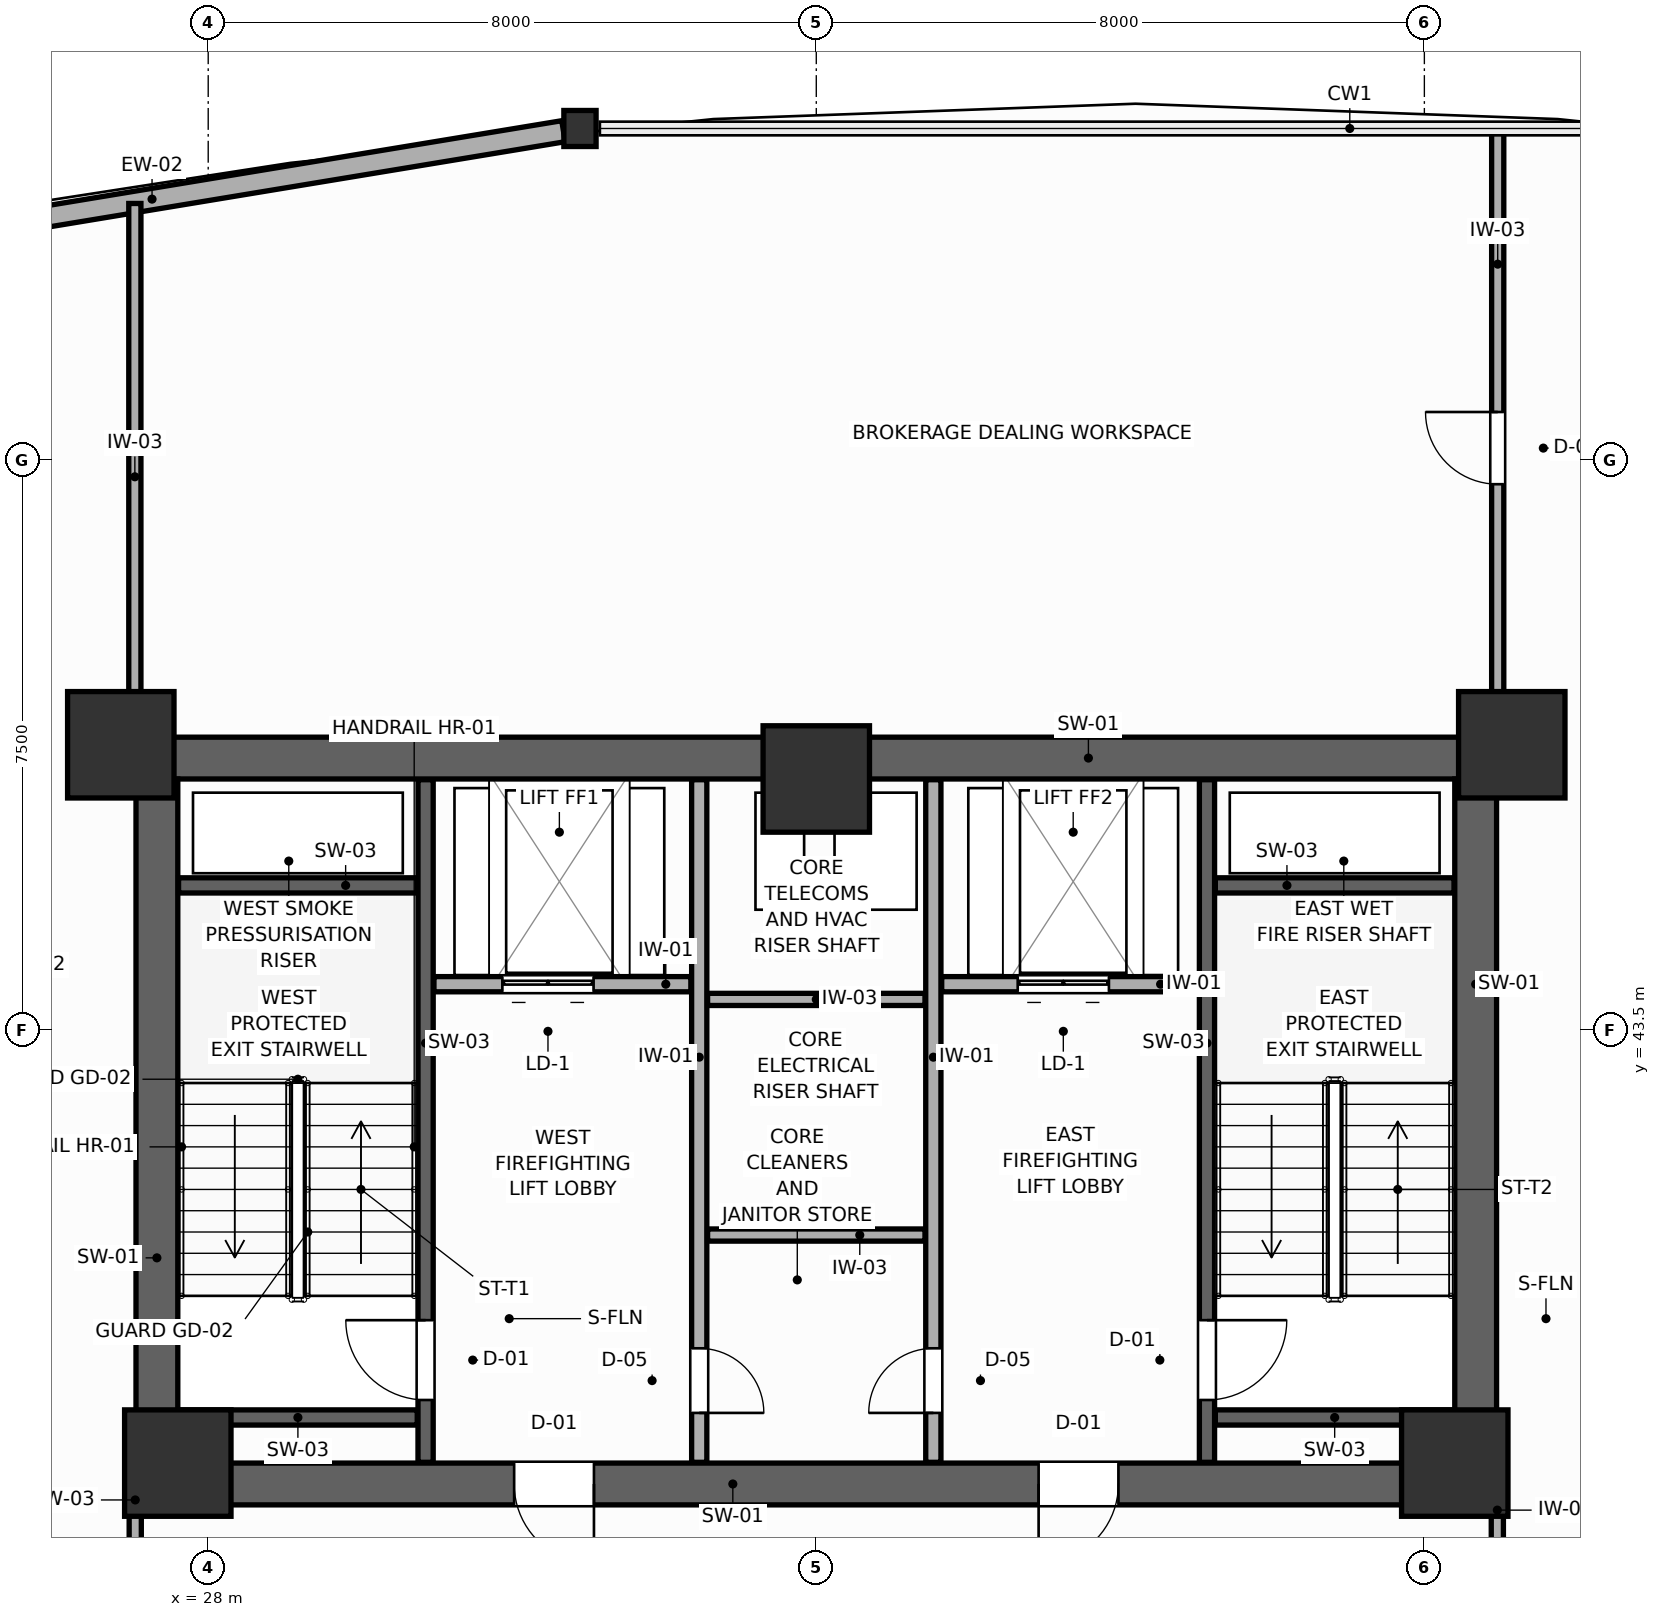
"""IFC4 building model, lengths in metres.
Left out: names, types, materials, properties, quantities, classifications, styles, units other than length and angle.
Written with IfcOpenShell. Run it as: python <this file> out.ifc"""

import sys

from ifc_helpers import new_model, si_unit, direction, frame, frame_2d, origin, origin_2d, place, context, subcontext, project, spatial, rectangle, i_section, extrude, source, transform, mapped, element, fill, save


model = new_model("IFC4")
c1 = context("Model", 3, precision=1e-05, world=origin(), true_north=direction((0.0, 1.0)))
c2 = subcontext(c1, "Body", "Model", "MODEL_VIEW")
j1 = project(units=[si_unit("LENGTHUNIT", "METRE"), si_unit("PLANEANGLEUNIT", "RADIAN")], contexts=[c1])
p1 = place(None, origin())
s1 = spatial("IfcSite", under=j1, at=p1, CompositionType="ELEMENT")
p2 = place(p1, origin())
s2 = spatial("IfcBuilding", under=s1, at=p2, CompositionType="ELEMENT")
p3 = place(p2, frame((0.0, 0.0, 91.2)))
s3 = spatial("IfcBuildingStorey", under=s2, at=p3, CompositionType="ELEMENT", Elevation=91.2)
p4 = place(p3, frame((27.05, 47.075, 0.0), z_axis=(0.0, 0.0, 1.0), x_axis=(1.0, 0.0, 0.0)))
e1 = element("IfcWall", 1, at=p4, inside=s3, PredefinedType="SHEAR", context=c2, shape_type="SweptSolid", body=[
    extrude(rectangle(XDim=17.9, YDim=0.55, at=frame_2d((8.95, 0.0))), origin(), (0.0, 0.0, 1.0), 3.9),
])
p5 = place(p3, frame((27.05, 37.525, 0.0), z_axis=(0.0, 0.0, 1.0), x_axis=(1.0, 0.0, 0.0)))
e2 = element("IfcWall", 2, at=p5, inside=s3, PredefinedType="SHEAR", context=c2, shape_type="SweptSolid", body=[
    extrude(rectangle(XDim=17.9, YDim=0.55, at=frame_2d((8.95, 0.0))), origin(), (0.0, 0.0, 1.0), 3.9),
])
p6 = place(p5, frame((4.975, 0.0, 0.0)))
e3 = element("IfcOpeningElement", 3, at=p6, cuts=e2, PredefinedType="OPENING", context=c2, shape_type="SweptSolid", body=[
    extrude(rectangle(XDim=1.05, YDim=2.1, at=frame_2d((0.525, 1.05))), frame((0.0, 0.285, 0.0), z_axis=(0.0, -1.0, 0.0), x_axis=(1.0, 0.0, 0.0)), (0.0, 0.0, 1.0), 0.57),
])
p7 = place(p5, frame((11.875, 0.0, 0.0)))
e4 = element("IfcOpeningElement", 4, at=p7, cuts=e2, PredefinedType="OPENING", context=c2, shape_type="SweptSolid", body=[
    extrude(rectangle(XDim=1.05, YDim=2.1, at=frame_2d((0.525, 1.05))), frame((0.0, 0.285, 0.0), z_axis=(0.0, -1.0, 0.0), x_axis=(1.0, 0.0, 0.0)), (0.0, 0.0, 1.0), 0.57),
])
for number, where, z_axis, x_axis in (
    (5, (27.325, 37.8, 0.0), (0.0, 0.0, 1.0), (0.0, 1.0, 0.0)),
    (6, (44.675, 37.8, 0.0), (0.0, 0.0, 1.0), (0.0, 1.0, 0.0)),
):
    element("IfcWall", number, at=place(p3, frame(where, z_axis=z_axis, x_axis=x_axis)), inside=s3, PredefinedType="SHEAR", context=c2, shape_type="SweptSolid", body=[
        extrude(rectangle(XDim=9.0, YDim=0.55, at=frame_2d((4.5, 0.0))), origin(), (0.0, 0.0, 1.0), 3.9),
    ])
m1 = source(origin(), c2, "Body", "SweptSolid", [
    extrude(rectangle(XDim=1.4, YDim=1.4, at=origin_2d()), origin(), (0.0, 0.0, 1.0), 3.9),
])
for number, where, z_axis, x_axis in (
    (7, (26.85, 47.25, 0.0), (0.0, 0.0, 1.0), (1.0, 0.0, 0.0)),
    (8, (45.15, 47.25, 0.0), (0.0, 0.0, 1.0), (1.0, 0.0, 0.0)),
    (9, (27.6, 37.8, 0.0), (0.0, 0.0, 1.0), (1.0, 0.0, 0.0)),
    (10, (44.4, 37.8, 0.0), (0.0, 0.0, 1.0), (1.0, 0.0, 0.0)),
    (11, (36.0, 46.8, 0.0), (0.0, 0.0, 1.0), (1.0, 0.0, 0.0)),
):
    element("IfcColumn", number, at=place(p3, frame(where, z_axis=z_axis, x_axis=x_axis)), inside=s3, PredefinedType="COLUMN", context=c2, shape_type="MappedRepresentation", body=[
        mapped(m1, transform((0.0, 0.0, 0.0), scale=1.0)),
    ])
m2 = source(origin(), c2, "Body", "SweptSolid", [
    extrude(i_section(OverallWidth=0.424, OverallDepth=0.474, WebThickness=0.045, FlangeThickness=0.072, FilletRadius=0.015, at=origin_2d()), origin(), (0.0, 0.0, 1.0), 3.9),
])
p8 = place(p3, frame((32.891, 55.358, 0.0), z_axis=(0.0, 0.0, 1.0), x_axis=(1.0, 0.0, 0.0)))
e12 = element("IfcColumn", 12, at=p8, inside=s3, PredefinedType="COLUMN", context=c2, shape_type="MappedRepresentation", body=[
    mapped(m2, transform((0.0, 0.0, 0.0), scale=1.0)),
])
p9 = place(p3, frame((32.674, 55.322, 0.0), z_axis=(0.0, 0.0, 1.0), x_axis=(-0.986649424809, -0.162858566012, 0.0)))
e13 = element("IfcWall", 13, at=p9, inside=s3, PredefinedType="SOLIDWALL", context=c2, shape_type="SweptSolid", body=[
    extrude(rectangle(XDim=16.836, YDim=0.28, at=frame_2d((8.418, 0.0))), origin(), (0.0, 0.0, 1.0), 3.23),
])
p10 = place(p9, frame((11.152, 0.0, 0.75)))
e14 = element("IfcOpeningElement", 14, at=p10, cuts=e13, PredefinedType="OPENING", context=c2, shape_type="SweptSolid", body=[
    extrude(rectangle(XDim=1.7, YDim=1.75, at=frame_2d((0.85, 0.875))), frame((0.0, 0.15, 0.0), z_axis=(0.0, -1.0, 0.0), x_axis=(1.0, 0.0, 0.0)), (0.0, 0.0, 1.0), 0.3),
])
p11 = place(p3, frame((30.86, 37.81, 0.0), z_axis=(0.0, 0.0, 1.0), x_axis=(0.0, 1.0, 0.0)))
e15 = element("IfcWall", 15, at=p11, inside=s3, PredefinedType="SHEAR", context=c2, shape_type="SweptSolid", body=[
    extrude(rectangle(XDim=8.98, YDim=0.2, at=frame_2d((4.49, 0.0))), origin(), (0.0, 0.0, 1.0), 3.9),
])
p12 = place(p11, frame((0.82, 0.0, 0.0)))
e16 = element("IfcOpeningElement", 16, at=p12, cuts=e15, PredefinedType="OPENING", context=c2, shape_type="SweptSolid", body=[
    extrude(rectangle(XDim=1.05, YDim=2.1, at=frame_2d((0.525, 1.05))), frame((0.0, 0.11, 0.0), z_axis=(0.0, -1.0, 0.0), x_axis=(1.0, 0.0, 0.0)), (0.0, 0.0, 1.0), 0.22),
])
for number, where, z_axis, x_axis in (
    (17, (27.61, 45.4, 0.0), (0.0, 0.0, 1.0), (1.0, 0.0, 0.0)),
    (18, (27.61, 38.4, 0.0), (0.0, 0.0, 1.0), (1.0, 0.0, 0.0)),
):
    element("IfcWall", number, at=place(p3, frame(where, z_axis=z_axis, x_axis=x_axis)), inside=s3, PredefinedType="SHEAR", context=c2, shape_type="SweptSolid", body=[
        extrude(rectangle(XDim=3.14, YDim=0.2, at=frame_2d((1.57, 0.0))), origin(), (0.0, 0.0, 1.0), 3.9),
    ])
p13 = place(p3, frame((41.14, 37.81, 0.0), z_axis=(0.0, 0.0, 1.0), x_axis=(0.0, 1.0, 0.0)))
e19 = element("IfcWall", 19, at=p13, inside=s3, PredefinedType="SHEAR", context=c2, shape_type="SweptSolid", body=[
    extrude(rectangle(XDim=8.98, YDim=0.2, at=frame_2d((4.49, 0.0))), origin(), (0.0, 0.0, 1.0), 3.9),
])
p14 = place(p13, frame((0.82, 0.0, 0.0)))
e20 = element("IfcOpeningElement", 20, at=p14, cuts=e19, PredefinedType="OPENING", context=c2, shape_type="SweptSolid", body=[
    extrude(rectangle(XDim=1.05, YDim=2.1, at=frame_2d((0.525, 1.05))), frame((0.0, 0.11, 0.0), z_axis=(0.0, -1.0, 0.0), x_axis=(1.0, 0.0, 0.0)), (0.0, 0.0, 1.0), 0.22),
])
for number, where, z_axis, x_axis in (
    (21, (41.25, 45.4, 0.0), (0.0, 0.0, 1.0), (1.0, 0.0, 0.0)),
    (22, (41.25, 38.4, 0.0), (0.0, 0.0, 1.0), (1.0, 0.0, 0.0)),
):
    element("IfcWall", number, at=place(p3, frame(where, z_axis=z_axis, x_axis=x_axis)), inside=s3, PredefinedType="SHEAR", context=c2, shape_type="SweptSolid", body=[
        extrude(rectangle(XDim=3.14, YDim=0.2, at=frame_2d((1.57, 0.0))), origin(), (0.0, 0.0, 1.0), 3.9),
    ])
p15 = place(p3, frame((30.97, 44.1, 0.0), z_axis=(0.0, 0.0, 1.0), x_axis=(1.0, 0.0, 0.0)))
e23 = element("IfcWall", 23, at=p15, inside=s3, PredefinedType="PARTITIONING", context=c2, shape_type="SweptSolid", body=[
    extrude(rectangle(XDim=3.38, YDim=0.2, at=frame_2d((1.69, 0.0))), origin(), (0.0, 0.0, 1.0), 3.68),
])
p16 = place(p15, frame((0.9, 0.0, 0.0)))
e24 = element("IfcOpeningElement", 24, at=p16, cuts=e23, PredefinedType="OPENING", context=c2, shape_type="SweptSolid", body=[
    extrude(rectangle(XDim=1.2, YDim=2.1, at=frame_2d((0.6, 1.05))), frame((0.0, 0.11, 0.0), z_axis=(0.0, -1.0, 0.0), x_axis=(1.0, 0.0, 0.0)), (0.0, 0.0, 1.0), 0.22),
])
p17 = place(p3, frame((37.65, 44.1, 0.0), z_axis=(0.0, 0.0, 1.0), x_axis=(1.0, 0.0, 0.0)))
e25 = element("IfcWall", 25, at=p17, inside=s3, PredefinedType="PARTITIONING", context=c2, shape_type="SweptSolid", body=[
    extrude(rectangle(XDim=3.38, YDim=0.2, at=frame_2d((1.69, 0.0))), origin(), (0.0, 0.0, 1.0), 3.68),
])
p18 = place(p17, frame((1.0, 0.0, 0.0)))
e26 = element("IfcOpeningElement", 26, at=p18, cuts=e25, PredefinedType="OPENING", context=c2, shape_type="SweptSolid", body=[
    extrude(rectangle(XDim=1.2, YDim=2.1, at=frame_2d((0.6, 1.05))), frame((0.0, 0.11, 0.0), z_axis=(0.0, -1.0, 0.0), x_axis=(1.0, 0.0, 0.0)), (0.0, 0.0, 1.0), 0.22),
])
p19 = place(p3, frame((34.46, 37.81, 0.0), z_axis=(0.0, 0.0, 1.0), x_axis=(0.0, 1.0, 0.0)))
e27 = element("IfcWall", 27, at=p19, inside=s3, PredefinedType="PARTITIONING", context=c2, shape_type="SweptSolid", body=[
    extrude(rectangle(XDim=8.98, YDim=0.2, at=frame_2d((4.49, 0.0))), origin(), (0.0, 0.0, 1.0), 3.68),
])
p20 = place(p19, frame((0.65, 0.0, 0.0)))
e28 = element("IfcOpeningElement", 28, at=p20, cuts=e27, PredefinedType="OPENING", context=c2, shape_type="SweptSolid", body=[
    extrude(rectangle(XDim=0.85, YDim=2.05, at=frame_2d((0.425, 1.025))), frame((0.0, 0.11, 0.0), z_axis=(0.0, -1.0, 0.0), x_axis=(1.0, 0.0, 0.0)), (0.0, 0.0, 1.0), 0.22),
])
p21 = place(p3, frame((37.54, 37.81, 0.0), z_axis=(0.0, 0.0, 1.0), x_axis=(0.0, 1.0, 0.0)))
e29 = element("IfcWall", 29, at=p21, inside=s3, PredefinedType="PARTITIONING", context=c2, shape_type="SweptSolid", body=[
    extrude(rectangle(XDim=8.98, YDim=0.2, at=frame_2d((4.49, 0.0))), origin(), (0.0, 0.0, 1.0), 3.68),
])
p22 = place(p21, frame((0.65, 0.0, 0.0)))
e30 = element("IfcOpeningElement", 30, at=p22, cuts=e29, PredefinedType="OPENING", context=c2, shape_type="SweptSolid", body=[
    extrude(rectangle(XDim=0.85, YDim=2.05, at=frame_2d((0.425, 1.025))), frame((0.0, 0.11, 0.0), z_axis=(0.0, -1.0, 0.0), x_axis=(1.0, 0.0, 0.0)), (0.0, 0.0, 1.0), 0.22),
])
for number, where, z_axis, x_axis in (
    (31, (34.57, 40.8, 0.0), (0.0, 0.0, 1.0), (1.0, 0.0, 0.0)),
    (32, (34.57, 43.9, 0.0), (0.0, 0.0, 1.0), (1.0, 0.0, 0.0)),
):
    element("IfcWall", number, at=place(p3, frame(where, z_axis=z_axis, x_axis=x_axis)), inside=s3, PredefinedType="PARTITIONING", context=c2, shape_type="SweptSolid", body=[
        extrude(rectangle(XDim=2.86, YDim=0.16, at=frame_2d((1.43, 0.0))), origin(), (0.0, 0.0, 1.0), 3.68),
    ])
p23 = place(p3, frame((27.04, 35.0, 0.0), z_axis=(0.0, 0.0, 1.0), x_axis=(0.0, 1.0, 0.0)))
e33 = element("IfcWall", 33, at=p23, inside=s3, PredefinedType="PARTITIONING", context=c2, shape_type="SweptSolid", body=[
    extrude(rectangle(XDim=2.65, YDim=0.16, at=frame_2d((1.325, 0.0))), origin(), (0.0, 0.0, 1.0), 3.68),
])
p24 = place(p23, frame((0.75, 0.0, 0.0)))
e34 = element("IfcOpeningElement", 34, at=p24, cuts=e33, PredefinedType="OPENING", context=c2, shape_type="SweptSolid", body=[
    extrude(rectangle(XDim=1.05, YDim=2.1, at=frame_2d((0.525, 1.05))), frame((0.0, 0.09, 0.0), z_axis=(0.0, -1.0, 0.0), x_axis=(1.0, 0.0, 0.0)), (0.0, 0.0, 1.0), 0.18),
])
p25 = place(p3, frame((44.96, 35.0, 0.0), z_axis=(0.0, 0.0, 1.0), x_axis=(0.0, 1.0, 0.0)))
e35 = element("IfcWall", 35, at=p25, inside=s3, PredefinedType="PARTITIONING", context=c2, shape_type="SweptSolid", body=[
    extrude(rectangle(XDim=2.65, YDim=0.16, at=frame_2d((1.325, 0.0))), origin(), (0.0, 0.0, 1.0), 3.68),
])
p26 = place(p25, frame((0.75, 0.0, 0.0)))
e36 = element("IfcOpeningElement", 36, at=p26, cuts=e35, PredefinedType="OPENING", context=c2, shape_type="SweptSolid", body=[
    extrude(rectangle(XDim=1.05, YDim=2.1, at=frame_2d((0.525, 1.05))), frame((0.0, 0.09, 0.0), z_axis=(0.0, -1.0, 0.0), x_axis=(1.0, 0.0, 0.0)), (0.0, 0.0, 1.0), 0.18),
])
p27 = place(p3, frame((44.965, 47.18, 0.0), z_axis=(0.0, 0.0, 1.0), x_axis=(0.0, 1.0, 0.0)))
e37 = element("IfcWall", 37, at=p27, inside=s3, PredefinedType="PARTITIONING", context=c2, shape_type="SweptSolid", body=[
    extrude(rectangle(XDim=8.158, YDim=0.16, at=frame_2d((4.079, 0.0))), origin(), (0.0, 0.0, 1.0), 3.68),
])
p28 = place(p27, frame((3.498, 0.0, 0.0)))
e38 = element("IfcOpeningElement", 38, at=p28, cuts=e37, PredefinedType="OPENING", context=c2, shape_type="SweptSolid", body=[
    extrude(rectangle(XDim=0.95, YDim=2.05, at=frame_2d((0.475, 1.025))), frame((0.0, 0.09, 0.0), z_axis=(0.0, -1.0, 0.0), x_axis=(1.0, 0.0, 0.0)), (0.0, 0.0, 1.0), 0.18),
])
p29 = place(p3, frame((27.035, 47.18, 0.0), z_axis=(0.0, 0.0, 1.0), x_axis=(0.0, 1.0, 0.0)))
e39 = element("IfcWall", 39, at=p29, inside=s3, PredefinedType="PARTITIONING", context=c2, shape_type="SweptSolid", body=[
    extrude(rectangle(XDim=7.191, YDim=0.16, at=frame_2d((3.596, 0.0))), origin(), (0.0, 0.0, 1.0), 3.68),
])
p30 = place(p12, origin())
e40 = element("IfcDoor", 40, at=p30, inside=s3, OperationType="SINGLE_SWING_RIGHT", PredefinedType="DOOR", context=c2, shape_type="SweptSolid", body=[
    extrude(rectangle(XDim=1.05, YDim=2.1, at=frame_2d((0.525, 1.05))), frame((0.0, 0.025, 0.0), z_axis=(0.0, -1.0, 0.0), x_axis=(1.0, 0.0, 0.0)), (0.0, 0.0, 1.0), 0.05),
])
fill(e16, e40)
p31 = place(p14, frame((1.05, 0.0, 0.0), z_axis=(0.0, 0.0, 1.0), x_axis=(-1.0, 0.0, 0.0)))
e41 = element("IfcDoor", 41, at=p31, inside=s3, OperationType="SINGLE_SWING_LEFT", PredefinedType="DOOR", context=c2, shape_type="SweptSolid", body=[
    extrude(rectangle(XDim=1.05, YDim=2.1, at=frame_2d((0.525, 1.05))), frame((0.0, 0.025, 0.0), z_axis=(0.0, -1.0, 0.0), x_axis=(1.0, 0.0, 0.0)), (0.0, 0.0, 1.0), 0.05),
])
fill(e20, e41)
p32 = place(p16, origin())
e42 = element("IfcDoor", 42, at=p32, inside=s3, OperationType="DOUBLE_DOOR_SLIDING", PredefinedType="DOOR", context=c2, shape_type="SweptSolid", body=[
    extrude(rectangle(XDim=1.2, YDim=2.1, at=frame_2d((0.6, 1.05))), frame((0.0, 0.025, 0.0), z_axis=(0.0, -1.0, 0.0), x_axis=(1.0, 0.0, 0.0)), (0.0, 0.0, 1.0), 0.05),
])
fill(e24, e42)
p33 = place(p18, origin())
e43 = element("IfcDoor", 43, at=p33, inside=s3, OperationType="DOUBLE_DOOR_SLIDING", PredefinedType="DOOR", context=c2, shape_type="SweptSolid", body=[
    extrude(rectangle(XDim=1.2, YDim=2.1, at=frame_2d((0.6, 1.05))), frame((0.0, 0.025, 0.0), z_axis=(0.0, -1.0, 0.0), x_axis=(1.0, 0.0, 0.0)), (0.0, 0.0, 1.0), 0.05),
])
fill(e26, e43)
p34 = place(p20, frame((0.85, 0.0, 0.0), z_axis=(0.0, 0.0, 1.0), x_axis=(-1.0, 0.0, 0.0)))
e44 = element("IfcDoor", 44, at=p34, inside=s3, OperationType="SINGLE_SWING_RIGHT", PredefinedType="DOOR", context=c2, shape_type="SweptSolid", body=[
    extrude(rectangle(XDim=0.85, YDim=2.05, at=frame_2d((0.425, 1.025))), frame((0.0, 0.025, 0.0), z_axis=(0.0, -1.0, 0.0), x_axis=(1.0, 0.0, 0.0)), (0.0, 0.0, 1.0), 0.05),
])
fill(e28, e44)
p35 = place(p22, origin())
e45 = element("IfcDoor", 45, at=p35, inside=s3, OperationType="SINGLE_SWING_LEFT", PredefinedType="DOOR", context=c2, shape_type="SweptSolid", body=[
    extrude(rectangle(XDim=0.85, YDim=2.05, at=frame_2d((0.425, 1.025))), frame((0.0, 0.025, 0.0), z_axis=(0.0, -1.0, 0.0), x_axis=(1.0, 0.0, 0.0)), (0.0, 0.0, 1.0), 0.05),
])
fill(e30, e45)
p36 = place(p28, origin())
e46 = element("IfcDoor", 46, at=p36, inside=s3, OperationType="SINGLE_SWING_RIGHT", PredefinedType="DOOR", context=c2, shape_type="SweptSolid", body=[
    extrude(rectangle(XDim=0.95, YDim=2.05, at=frame_2d((0.475, 1.025))), frame((0.0, 0.025, 0.0), z_axis=(0.0, -1.0, 0.0), x_axis=(1.0, 0.0, 0.0)), (0.0, 0.0, 1.0), 0.05),
])
fill(e38, e46)
p37 = place(p6, frame((1.05, 0.0, 0.0), z_axis=(0.0, 0.0, 1.0), x_axis=(-1.0, 0.0, 0.0)))
e47 = element("IfcDoor", 47, at=p37, inside=s3, OperationType="SINGLE_SWING_LEFT", PredefinedType="DOOR", context=c2, shape_type="SweptSolid", body=[
    extrude(rectangle(XDim=1.05, YDim=2.1, at=frame_2d((0.525, 1.05))), frame((0.0, 0.025, 0.0), z_axis=(0.0, -1.0, 0.0), x_axis=(1.0, 0.0, 0.0)), (0.0, 0.0, 1.0), 0.05),
])
fill(e3, e47)
p38 = place(p7, frame((1.05, 0.0, 0.0), z_axis=(0.0, 0.0, 1.0), x_axis=(-1.0, 0.0, 0.0)))
e48 = element("IfcDoor", 48, at=p38, inside=s3, OperationType="SINGLE_SWING_RIGHT", PredefinedType="DOOR", context=c2, shape_type="SweptSolid", body=[
    extrude(rectangle(XDim=1.05, YDim=2.1, at=frame_2d((0.525, 1.05))), frame((0.0, 0.025, 0.0), z_axis=(0.0, -1.0, 0.0), x_axis=(1.0, 0.0, 0.0)), (0.0, 0.0, 1.0), 0.05),
])
fill(e4, e48)
save(model, sys.argv[1])
